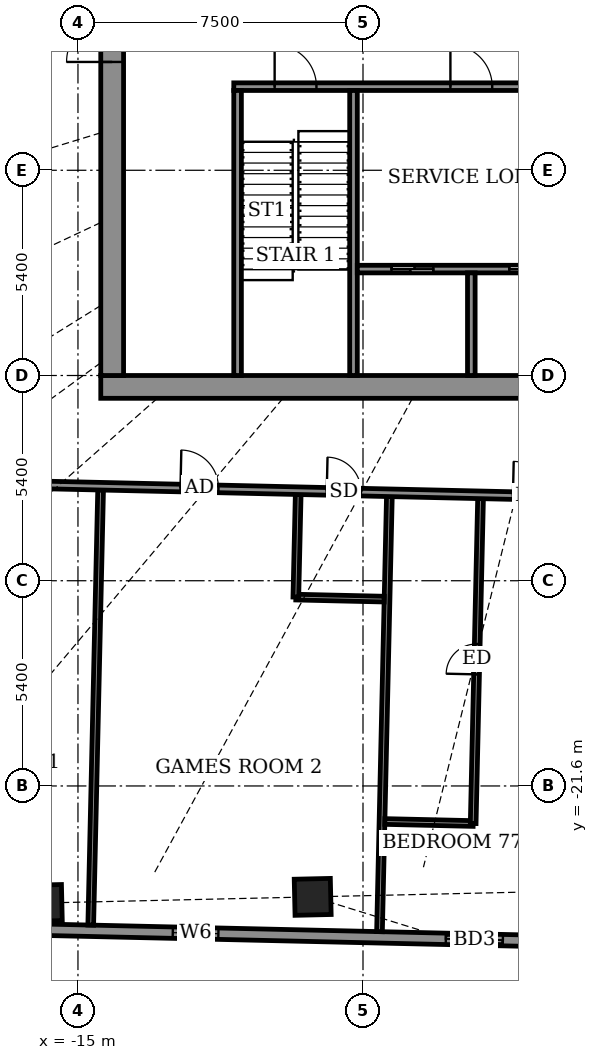
"""IFC4 building model, lengths in metres.
Left out: names, types, materials, properties, quantities, classifications, styles, units other than length and angle.
Written with IfcOpenShell. Run it as: python <this file> out.ifc"""

import sys

from ifc_helpers import new_model, si_unit, direction, frame, frame_2d, origin, origin_2d, place, context, subcontext, project, spatial, rectangle, extrude, element, fill, save


model = new_model("IFC4")
c1 = context("Model", 3, precision=1e-05, world=origin(), true_north=direction((0.0, 1.0)))
c2 = subcontext(c1, "Body", "Model", "MODEL_VIEW")
j1 = project(units=[si_unit("LENGTHUNIT", "METRE"), si_unit("PLANEANGLEUNIT", "RADIAN")], contexts=[c1])
p1 = place(None, origin())
s1 = spatial("IfcSite", under=j1, at=p1, CompositionType="ELEMENT")
p2 = place(p1, origin())
s2 = spatial("IfcBuilding", under=s1, at=p2, CompositionType="ELEMENT")
p3 = place(p2, frame((0.0, 0.0, 301.5)))
s3 = spatial("IfcBuildingStorey", under=s2, at=p3, CompositionType="ELEMENT", Elevation=301.5)
for number, where, z_axis, x_axis in (
    (1, (-15.899, -24.679, -0.55), (0.0, 0.0, 1.0), (1.0, 0.023, 0.0)),
    (2, (-8.824, -24.518, -0.55), (0.0, 0.0, 1.0), (1.0, 0.023, 0.0)),
):
    element("IfcColumn", number, at=place(p3, frame(where, z_axis=z_axis, x_axis=x_axis)), inside=s3, PredefinedType="COLUMN", context=c2, shape_type="SweptSolid", body=[
        extrude(rectangle(XDim=0.95, YDim=0.95, at=origin_2d()), origin(), (0.0, 0.0, 1.0), 4.6),
    ])
p4 = place(p3, frame((-28.264, -25.102, 0.0), z_axis=(0.0, 0.0, 1.0), x_axis=(0.999742520573, -0.022691244094, 0.0)))
e3 = element("IfcWall", 3, at=p4, inside=s3, PredefinedType="SOLIDWALL", context=c2, shape_type="SweptSolid", body=[
    extrude(rectangle(XDim=51.3, YDim=0.3, at=frame_2d((25.65, 0.0))), origin(), (0.0, 0.0, 1.0), 2.25),
])
p5 = place(p4, frame((1.745, 0.0, 0.0)))
e4 = element("IfcOpeningElement", 4, at=p5, cuts=e3, PredefinedType="OPENING", context=c2, shape_type="SweptSolid", body=[
    extrude(rectangle(XDim=1.5, YDim=2.0, at=frame_2d((0.75, 1.0))), frame((0.0, 0.16, 0.0), z_axis=(0.0, -1.0, 0.0), x_axis=(1.0, 0.0, 0.0)), (0.0, 0.0, 1.0), 0.32),
])
p6 = place(p4, frame((9.178, 0.0, 0.5)))
e5 = element("IfcOpeningElement", 5, at=p6, cuts=e3, PredefinedType="OPENING", context=c2, shape_type="SweptSolid", body=[
    extrude(rectangle(XDim=1.2, YDim=1.1, at=frame_2d((0.6, 0.55))), frame((0.0, 0.16, 0.0), z_axis=(0.0, -1.0, 0.0), x_axis=(1.0, 0.0, 0.0)), (0.0, 0.0, 1.0), 0.32),
])
p7 = place(p4, frame((15.763, 0.0, 0.5)))
e6 = element("IfcOpeningElement", 6, at=p7, cuts=e3, PredefinedType="OPENING", context=c2, shape_type="SweptSolid", body=[
    extrude(rectangle(XDim=1.2, YDim=1.1, at=frame_2d((0.6, 0.55))), frame((0.0, 0.16, 0.0), z_axis=(0.0, -1.0, 0.0), x_axis=(1.0, 0.0, 0.0)), (0.0, 0.0, 1.0), 0.32),
])
p8 = place(p4, frame((22.95, 0.0, 0.0)))
e7 = element("IfcOpeningElement", 7, at=p8, cuts=e3, PredefinedType="OPENING", context=c2, shape_type="SweptSolid", body=[
    extrude(rectangle(XDim=1.5, YDim=2.0, at=frame_2d((0.75, 1.0))), frame((0.0, 0.16, 0.0), z_axis=(0.0, -1.0, 0.0), x_axis=(1.0, 0.0, 0.0)), (0.0, 0.0, 1.0), 0.32),
])
p9 = place(p4, frame((28.219, 0.0, 0.0)))
e8 = element("IfcOpeningElement", 8, at=p9, cuts=e3, PredefinedType="OPENING", context=c2, shape_type="SweptSolid", body=[
    extrude(rectangle(XDim=1.5, YDim=2.0, at=frame_2d((0.75, 1.0))), frame((0.0, 0.16, 0.0), z_axis=(0.0, -1.0, 0.0), x_axis=(1.0, 0.0, 0.0)), (0.0, 0.0, 1.0), 0.32),
])
p10 = place(p4, frame((34.85, 0.0, 0.5)))
e9 = element("IfcOpeningElement", 9, at=p10, cuts=e3, PredefinedType="OPENING", context=c2, shape_type="SweptSolid", body=[
    extrude(rectangle(XDim=1.2, YDim=1.1, at=frame_2d((0.6, 0.55))), frame((0.0, 0.16, 0.0), z_axis=(0.0, -1.0, 0.0), x_axis=(1.0, 0.0, 0.0)), (0.0, 0.0, 1.0), 0.32),
])
p11 = place(p4, frame((43.375, 0.0, 0.5)))
e10 = element("IfcOpeningElement", 10, at=p11, cuts=e3, PredefinedType="OPENING", context=c2, shape_type="SweptSolid", body=[
    extrude(rectangle(XDim=1.2, YDim=1.1, at=frame_2d((0.6, 0.55))), frame((0.0, 0.16, 0.0), z_axis=(0.0, -1.0, 0.0), x_axis=(1.0, 0.0, 0.0)), (0.0, 0.0, 1.0), 0.32),
])
p12 = place(p4, frame((49.25, 0.0, 0.5)))
e11 = element("IfcOpeningElement", 11, at=p12, cuts=e3, PredefinedType="OPENING", context=c2, shape_type="SweptSolid", body=[
    extrude(rectangle(XDim=1.2, YDim=1.1, at=frame_2d((0.6, 0.55))), frame((0.0, 0.16, 0.0), z_axis=(0.0, -1.0, 0.0), x_axis=(1.0, 0.0, 0.0)), (0.0, 0.0, 1.0), 0.32),
])
p13 = place(p3, frame((-14.664, -25.261, 0.0), z_axis=(0.0, 0.0, 1.0), x_axis=(0.022706391805, 0.999742176649, 0.0)))
e12 = element("IfcWall", 12, at=p13, inside=s3, PredefinedType="PARTITIONING", context=c2, shape_type="SweptSolid", body=[
    extrude(rectangle(XDim=11.451, YDim=0.15, at=frame_2d((5.726, 0.0))), origin(), (0.0, 0.0, 1.0), 2.25),
])
p14 = place(p3, frame((-7.066, -25.433, 0.0), z_axis=(0.0, 0.0, 1.0), x_axis=(0.022708327922, 0.999742132674, 0.0)))
e13 = element("IfcWall", 13, at=p14, inside=s3, PredefinedType="PARTITIONING", context=c2, shape_type="SweptSolid", body=[
    extrude(rectangle(XDim=11.45, YDim=0.15, at=frame_2d((5.725, 0.0))), origin(), (0.0, 0.0, 1.0), 2.25),
])
p15 = place(p3, frame((-6.925, -22.535, 0.0), z_axis=(0.0, 0.0, 1.0), x_axis=(0.999740260747, -0.02279059109, 0.0)))
e14 = element("IfcWall", 14, at=p15, inside=s3, PredefinedType="PARTITIONING", context=c2, shape_type="SweptSolid", body=[
    extrude(rectangle(XDim=2.324, YDim=0.15, at=frame_2d((1.162, 0.0))), origin(), (0.0, 0.0, 1.0), 2.75),
])
p16 = place(p3, frame((-4.601, -22.588, 0.0), z_axis=(0.0, 0.0, 1.0), x_axis=(0.022700649323, 0.999742307057, 0.0)))
e15 = element("IfcWall", 15, at=p16, inside=s3, PredefinedType="PARTITIONING", context=c2, shape_type="SweptSolid", body=[
    extrude(rectangle(XDim=8.55, YDim=0.15, at=frame_2d((4.275, 0.0))), origin(), (0.0, 0.0, 1.0), 2.75),
])
p17 = place(p16, frame((3.925, 0.0, 0.0)))
e16 = element("IfcOpeningElement", 16, at=p17, cuts=e15, PredefinedType="OPENING", context=c2, shape_type="SweptSolid", body=[
    extrude(rectangle(XDim=0.8, YDim=2.1, at=frame_2d((0.4, 1.05))), frame((0.0, 0.085, 0.0), z_axis=(0.0, -1.0, 0.0), x_axis=(1.0, 0.0, 0.0)), (0.0, 0.0, 1.0), 0.17),
])
p18 = place(p3, frame((-9.267, -16.631, 0.0), z_axis=(0.0, 0.0, 1.0), x_axis=(0.99974053329, -0.022778632478, 0.0)))
e17 = element("IfcWall", 17, at=p18, inside=s3, PredefinedType="PARTITIONING", context=c2, shape_type="SweptSolid", body=[
    extrude(rectangle(XDim=2.326, YDim=0.15, at=frame_2d((1.163, 0.0))), origin(), (0.0, 0.0, 1.0), 2.55),
])
p19 = place(p3, frame((-9.267, -16.631, 0.0), z_axis=(0.0, 0.0, 1.0), x_axis=(0.02295958807, 0.999736393914, 0.0)))
e18 = element("IfcWall", 18, at=p19, inside=s3, PredefinedType="PARTITIONING", context=c2, shape_type="SweptSolid", body=[
    extrude(rectangle(XDim=2.701, YDim=0.15, at=frame_2d((1.351, 0.0))), origin(), (0.0, 0.0, 1.0), 2.55),
])
p20 = place(p3, frame((-27.058, -13.426, 0.0), z_axis=(0.0, 0.0, 1.0), x_axis=(0.999742445627, -0.022694545867, 0.0)))
e19 = element("IfcWall", 19, at=p20, inside=s3, PredefinedType="PARTITIONING", context=c2, shape_type="SweptSolid", body=[
    extrude(rectangle(XDim=54.509, YDim=0.2, at=frame_2d((27.255, 0.0))), origin(), (0.0, 0.0, 1.0), 2.15),
])
p21 = place(p20, frame((0.2, 0.0, 0.0)))
e20 = element("IfcOpeningElement", 20, at=p21, cuts=e19, PredefinedType="OPENING", context=c2, shape_type="SweptSolid", body=[
    extrude(rectangle(XDim=1.0, YDim=2.1, at=frame_2d((0.5, 1.05))), frame((0.0, 0.11, 0.0), z_axis=(0.0, -1.0, 0.0), x_axis=(1.0, 0.0, 0.0)), (0.0, 0.0, 1.0), 0.22),
])
p22 = place(p20, frame((4.809, 0.0, 0.0)))
e21 = element("IfcOpeningElement", 21, at=p22, cuts=e19, PredefinedType="OPENING", context=c2, shape_type="SweptSolid", body=[
    extrude(rectangle(XDim=0.9, YDim=2.1, at=frame_2d((0.45, 1.05))), frame((0.0, 0.11, 0.0), z_axis=(0.0, -1.0, 0.0), x_axis=(1.0, 0.0, 0.0)), (0.0, 0.0, 1.0), 0.22),
])
p23 = place(p20, frame((10.309, 0.0, 0.0)))
e22 = element("IfcOpeningElement", 22, at=p23, cuts=e19, PredefinedType="OPENING", context=c2, shape_type="SweptSolid", body=[
    extrude(rectangle(XDim=1.0, YDim=2.1, at=frame_2d((0.5, 1.05))), frame((0.0, 0.11, 0.0), z_axis=(0.0, -1.0, 0.0), x_axis=(1.0, 0.0, 0.0)), (0.0, 0.0, 1.0), 0.22),
])
p24 = place(p20, frame((7.309, 0.0, 0.0)))
e23 = element("IfcOpeningElement", 23, at=p24, cuts=e19, PredefinedType="OPENING", context=c2, shape_type="SweptSolid", body=[
    extrude(rectangle(XDim=0.9, YDim=2.1, at=frame_2d((0.45, 1.05))), frame((0.0, 0.11, 0.0), z_axis=(0.0, -1.0, 0.0), x_axis=(1.0, 0.0, 0.0)), (0.0, 0.0, 1.0), 0.22),
])
p25 = place(p20, frame((14.759, 0.0, 0.0)))
e24 = element("IfcOpeningElement", 24, at=p25, cuts=e19, PredefinedType="OPENING", context=c2, shape_type="SweptSolid", body=[
    extrude(rectangle(XDim=1.0, YDim=2.1, at=frame_2d((0.5, 1.05))), frame((0.0, 0.11, 0.0), z_axis=(0.0, -1.0, 0.0), x_axis=(1.0, 0.0, 0.0)), (0.0, 0.0, 1.0), 0.22),
])
p26 = place(p20, frame((18.609, 0.0, 0.0)))
e25 = element("IfcOpeningElement", 25, at=p26, cuts=e19, PredefinedType="OPENING", context=c2, shape_type="SweptSolid", body=[
    extrude(rectangle(XDim=0.9, YDim=2.1, at=frame_2d((0.45, 1.05))), frame((0.0, 0.11, 0.0), z_axis=(0.0, -1.0, 0.0), x_axis=(1.0, 0.0, 0.0)), (0.0, 0.0, 1.0), 0.22),
])
p27 = place(p20, frame((23.509, 0.0, 0.0)))
e26 = element("IfcOpeningElement", 26, at=p27, cuts=e19, PredefinedType="OPENING", context=c2, shape_type="SweptSolid", body=[
    extrude(rectangle(XDim=0.9, YDim=2.1, at=frame_2d((0.45, 1.05))), frame((0.0, 0.11, 0.0), z_axis=(0.0, -1.0, 0.0), x_axis=(1.0, 0.0, 0.0)), (0.0, 0.0, 1.0), 0.22),
])
p28 = place(p20, frame((26.109, 0.0, 0.0)))
e27 = element("IfcOpeningElement", 27, at=p28, cuts=e19, PredefinedType="OPENING", context=c2, shape_type="SweptSolid", body=[
    extrude(rectangle(XDim=0.9, YDim=2.1, at=frame_2d((0.45, 1.05))), frame((0.0, 0.11, 0.0), z_axis=(0.0, -1.0, 0.0), x_axis=(1.0, 0.0, 0.0)), (0.0, 0.0, 1.0), 0.22),
])
p29 = place(p20, frame((34.009, 0.0, 0.0)))
e28 = element("IfcOpeningElement", 28, at=p29, cuts=e19, PredefinedType="OPENING", context=c2, shape_type="SweptSolid", body=[
    extrude(rectangle(XDim=1.0, YDim=2.1, at=frame_2d((0.5, 1.05))), frame((0.0, 0.11, 0.0), z_axis=(0.0, -1.0, 0.0), x_axis=(1.0, 0.0, 0.0)), (0.0, 0.0, 1.0), 0.22),
])
p30 = place(p20, frame((41.234, 0.0, 0.0)))
e29 = element("IfcOpeningElement", 29, at=p30, cuts=e19, PredefinedType="OPENING", context=c2, shape_type="SweptSolid", body=[
    extrude(rectangle(XDim=1.0, YDim=2.1, at=frame_2d((0.5, 1.05))), frame((0.0, 0.11, 0.0), z_axis=(0.0, -1.0, 0.0), x_axis=(1.0, 0.0, 0.0)), (0.0, 0.0, 1.0), 0.22),
])
p31 = place(p20, frame((45.559, 0.0, 0.0)))
e30 = element("IfcOpeningElement", 30, at=p31, cuts=e19, PredefinedType="OPENING", context=c2, shape_type="SweptSolid", body=[
    extrude(rectangle(XDim=0.9, YDim=2.1, at=frame_2d((0.45, 1.05))), frame((0.0, 0.11, 0.0), z_axis=(0.0, -1.0, 0.0), x_axis=(1.0, 0.0, 0.0)), (0.0, 0.0, 1.0), 0.22),
])
p32 = place(p20, frame((50.587, 0.0, 0.0)))
e31 = element("IfcOpeningElement", 31, at=p32, cuts=e19, PredefinedType="OPENING", context=c2, shape_type="SweptSolid", body=[
    extrude(rectangle(XDim=1.0, YDim=2.1, at=frame_2d((0.5, 1.05))), frame((0.0, 0.11, 0.0), z_axis=(0.0, -1.0, 0.0), x_axis=(1.0, 0.0, 0.0)), (0.0, 0.0, 1.0), 0.22),
])
p33 = place(p3, frame((-14.4, -11.1, 0.0), z_axis=(0.0, 0.0, 1.0), x_axis=(1.0, 0.0, 0.0)))
e32 = element("IfcWall", 32, at=p33, inside=s3, PredefinedType="SHEAR", context=c2, shape_type="SweptSolid", body=[
    extrude(rectangle(XDim=28.8, YDim=0.6, at=frame_2d((14.4, 0.0))), origin(), (0.0, 0.0, 1.0), 4.6),
])
p34 = place(p3, frame((-14.1, -10.8, 0.0), z_axis=(0.0, 0.0, 1.0), x_axis=(0.0, 1.0, 0.0)))
e33 = element("IfcWall", 33, at=p34, inside=s3, PredefinedType="SHEAR", context=c2, shape_type="SweptSolid", body=[
    extrude(rectangle(XDim=21.6, YDim=0.6, at=frame_2d((10.8, 0.0))), origin(), (0.0, 0.0, 1.0), 4.6),
])
p35 = place(p34, frame((8.25, 0.0, 0.0)))
e34 = element("IfcOpeningElement", 34, at=p35, cuts=e33, PredefinedType="OPENING", context=c2, shape_type="SweptSolid", body=[
    extrude(rectangle(XDim=1.2, YDim=2.1, at=frame_2d((0.6, 1.05))), frame((0.0, 0.31, 0.0), z_axis=(0.0, -1.0, 0.0), x_axis=(1.0, 0.0, 0.0)), (0.0, 0.0, 1.0), 0.62),
])
p36 = place(p34, frame((15.25, 0.0, 0.0)))
e35 = element("IfcOpeningElement", 35, at=p36, cuts=e33, PredefinedType="OPENING", context=c2, shape_type="SweptSolid", body=[
    extrude(rectangle(XDim=1.2, YDim=2.1, at=frame_2d((0.6, 1.05))), frame((0.0, 0.31, 0.0), z_axis=(0.0, -1.0, 0.0), x_axis=(1.0, 0.0, 0.0)), (0.0, 0.0, 1.0), 0.62),
])
p37 = place(p3, frame((-10.9, -3.2, 0.0), z_axis=(0.0, 0.0, 1.0), x_axis=(1.0, 0.0, 0.0)))
e36 = element("IfcWall", 36, at=p37, inside=s3, PredefinedType="SHEAR", context=c2, shape_type="SweptSolid", body=[
    extrude(rectangle(XDim=21.8, YDim=0.2, at=frame_2d((10.9, 0.0))), origin(), (0.0, 0.0, 1.0), 4.05),
])
p38 = place(p37, frame((1.075, 0.0, 0.0)))
e37 = element("IfcOpeningElement", 37, at=p38, cuts=e36, PredefinedType="OPENING", context=c2, shape_type="SweptSolid", body=[
    extrude(rectangle(XDim=1.1, YDim=2.1, at=frame_2d((0.55, 1.05))), frame((0.0, 0.11, 0.0), z_axis=(0.0, -1.0, 0.0), x_axis=(1.0, 0.0, 0.0)), (0.0, 0.0, 1.0), 0.22),
])
p39 = place(p37, frame((10.325, 0.0, 0.0)))
e38 = element("IfcOpeningElement", 38, at=p39, cuts=e36, PredefinedType="OPENING", context=c2, shape_type="SweptSolid", body=[
    extrude(rectangle(XDim=1.1, YDim=2.1, at=frame_2d((0.55, 1.05))), frame((0.0, 0.11, 0.0), z_axis=(0.0, -1.0, 0.0), x_axis=(1.0, 0.0, 0.0)), (0.0, 0.0, 1.0), 0.22),
])
p40 = place(p37, frame((19.625, 0.0, 0.0)))
e39 = element("IfcOpeningElement", 39, at=p40, cuts=e36, PredefinedType="OPENING", context=c2, shape_type="SweptSolid", body=[
    extrude(rectangle(XDim=1.1, YDim=2.1, at=frame_2d((0.55, 1.05))), frame((0.0, 0.11, 0.0), z_axis=(0.0, -1.0, 0.0), x_axis=(1.0, 0.0, 0.0)), (0.0, 0.0, 1.0), 0.22),
])
p41 = place(p37, frame((5.7, 0.0, 0.0)))
e40 = element("IfcOpeningElement", 40, at=p41, cuts=e36, PredefinedType="OPENING", context=c2, shape_type="SweptSolid", body=[
    extrude(rectangle(XDim=1.1, YDim=2.1, at=frame_2d((0.55, 1.05))), frame((0.0, 0.11, 0.0), z_axis=(0.0, -1.0, 0.0), x_axis=(1.0, 0.0, 0.0)), (0.0, 0.0, 1.0), 0.22),
])
p42 = place(p37, frame((14.975, 0.0, 0.0)))
e41 = element("IfcOpeningElement", 41, at=p42, cuts=e36, PredefinedType="OPENING", context=c2, shape_type="SweptSolid", body=[
    extrude(rectangle(XDim=1.1, YDim=2.1, at=frame_2d((0.55, 1.05))), frame((0.0, 0.11, 0.0), z_axis=(0.0, -1.0, 0.0), x_axis=(1.0, 0.0, 0.0)), (0.0, 0.0, 1.0), 0.22),
])
for number, where, z_axis, x_axis in (
    (42, (-10.8, -10.8, 0.0), (0.0, 0.0, 1.0), (0.0, 1.0, 0.0)),
    (43, (-7.75, -10.8, 0.0), (0.0, 0.0, 1.0), (0.0, 1.0, 0.0)),
):
    element("IfcWall", number, at=place(p3, frame(where, z_axis=z_axis, x_axis=x_axis)), inside=s3, PredefinedType="SHEAR", context=c2, shape_type="SweptSolid", body=[
        extrude(rectangle(XDim=7.5, YDim=0.2, at=frame_2d((3.75, 0.0))), origin(), (0.0, 0.0, 1.0), 4.05),
    ])
p43 = place(p3, frame((-7.65, -8.0, 0.0), z_axis=(0.0, 0.0, 1.0), x_axis=(1.0, 0.0, 0.0)))
e44 = element("IfcWall", 44, at=p43, inside=s3, PredefinedType="SHEAR", context=c2, shape_type="SweptSolid", body=[
    extrude(rectangle(XDim=6.0, YDim=0.2, at=frame_2d((3.0, 0.0))), origin(), (0.0, 0.0, 1.0), 4.05),
])
p44 = place(p43, frame((0.9, 0.0, 0.0)))
e45 = element("IfcOpeningElement", 45, at=p44, cuts=e44, PredefinedType="OPENING", context=c2, shape_type="SweptSolid", body=[
    extrude(rectangle(XDim=1.1, YDim=2.1, at=frame_2d((0.55, 1.05))), frame((0.0, 0.11, 0.0), z_axis=(0.0, -1.0, 0.0), x_axis=(1.0, 0.0, 0.0)), (0.0, 0.0, 1.0), 0.22),
])
p45 = place(p43, frame((4.0, 0.0, 0.0)))
e46 = element("IfcOpeningElement", 46, at=p45, cuts=e44, PredefinedType="OPENING", context=c2, shape_type="SweptSolid", body=[
    extrude(rectangle(XDim=1.1, YDim=2.1, at=frame_2d((0.55, 1.05))), frame((0.0, 0.11, 0.0), z_axis=(0.0, -1.0, 0.0), x_axis=(1.0, 0.0, 0.0)), (0.0, 0.0, 1.0), 0.22),
])
p46 = place(p3, frame((-4.65, -10.8, 0.0), z_axis=(0.0, 0.0, 1.0), x_axis=(0.0, 1.0, 0.0)))
e47 = element("IfcWall", 47, at=p46, inside=s3, PredefinedType="SHEAR", context=c2, shape_type="SweptSolid", body=[
    extrude(rectangle(XDim=2.7, YDim=0.2, at=frame_2d((1.35, 0.0))), origin(), (0.0, 0.0, 1.0), 4.05),
])
p47 = place(p7, origin())
e48 = element("IfcWindow", 48, at=p47, inside=s3, PartitioningType="SINGLE_PANEL", PredefinedType="WINDOW", context=c2, shape_type="SweptSolid", body=[
    extrude(rectangle(XDim=1.2, YDim=1.1, at=frame_2d((0.6, 0.55))), frame((0.0, 0.03, 0.0), z_axis=(0.0, -1.0, 0.0), x_axis=(1.0, 0.0, 0.0)), (0.0, 0.0, 1.0), 0.06),
])
fill(e6, e48)
p48 = place(p8, origin())
e49 = element("IfcDoor", 49, at=p48, inside=s3, OperationType="SLIDING_TO_LEFT", PredefinedType="DOOR", context=c2, shape_type="SweptSolid", body=[
    extrude(rectangle(XDim=1.5, YDim=2.0, at=frame_2d((0.75, 1.0))), frame((0.0, 0.025, 0.0), z_axis=(0.0, -1.0, 0.0), x_axis=(1.0, 0.0, 0.0)), (0.0, 0.0, 1.0), 0.05),
])
fill(e7, e49)
p49 = place(p25, origin())
e50 = element("IfcDoor", 50, at=p49, inside=s3, OperationType="SINGLE_SWING_LEFT", PredefinedType="DOOR", context=c2, shape_type="SweptSolid", body=[
    extrude(rectangle(XDim=1.0, YDim=2.1, at=frame_2d((0.5, 1.05))), frame((0.0, 0.025, 0.0), z_axis=(0.0, -1.0, 0.0), x_axis=(1.0, 0.0, 0.0)), (0.0, 0.0, 1.0), 0.05),
])
fill(e24, e50)
p50 = place(p26, origin())
e51 = element("IfcDoor", 51, at=p50, inside=s3, OperationType="SINGLE_SWING_LEFT", PredefinedType="DOOR", context=c2, shape_type="SweptSolid", body=[
    extrude(rectangle(XDim=0.9, YDim=2.1, at=frame_2d((0.45, 1.05))), frame((0.0, 0.025, 0.0), z_axis=(0.0, -1.0, 0.0), x_axis=(1.0, 0.0, 0.0)), (0.0, 0.0, 1.0), 0.05),
])
fill(e25, e51)
p51 = place(p27, origin())
e52 = element("IfcDoor", 52, at=p51, inside=s3, OperationType="SINGLE_SWING_LEFT", PredefinedType="DOOR", context=c2, shape_type="SweptSolid", body=[
    extrude(rectangle(XDim=0.9, YDim=2.1, at=frame_2d((0.45, 1.05))), frame((0.0, 0.025, 0.0), z_axis=(0.0, -1.0, 0.0), x_axis=(1.0, 0.0, 0.0)), (0.0, 0.0, 1.0), 0.05),
])
fill(e26, e52)
p52 = place(p17, origin())
e53 = element("IfcDoor", 53, at=p52, inside=s3, OperationType="SINGLE_SWING_LEFT", PredefinedType="DOOR", context=c2, shape_type="SweptSolid", body=[
    extrude(rectangle(XDim=0.8, YDim=2.1, at=frame_2d((0.4, 1.05))), frame((0.0, 0.025, 0.0), z_axis=(0.0, -1.0, 0.0), x_axis=(1.0, 0.0, 0.0)), (0.0, 0.0, 1.0), 0.05),
])
fill(e16, e53)
p53 = place(p35, origin())
e54 = element("IfcDoor", 54, at=p53, inside=s3, OperationType="DOUBLE_DOOR_SINGLE_SWING", PredefinedType="DOOR", context=c2, shape_type="SweptSolid", body=[
    extrude(rectangle(XDim=1.2, YDim=2.1, at=frame_2d((0.6, 1.05))), frame((0.0, 0.025, 0.0), z_axis=(0.0, -1.0, 0.0), x_axis=(1.0, 0.0, 0.0)), (0.0, 0.0, 1.0), 0.05),
])
fill(e34, e54)
p54 = place(p44, origin())
e55 = element("IfcDoor", 55, at=p54, inside=s3, OperationType="SLIDING_TO_LEFT", PredefinedType="DOOR", context=c2, shape_type="SweptSolid", body=[
    extrude(rectangle(XDim=1.1, YDim=2.1, at=frame_2d((0.55, 1.05))), frame((0.0, 0.025, 0.0), z_axis=(0.0, -1.0, 0.0), x_axis=(1.0, 0.0, 0.0)), (0.0, 0.0, 1.0), 0.05),
])
fill(e45, e55)
p55 = place(p45, origin())
e56 = element("IfcDoor", 56, at=p55, inside=s3, OperationType="SLIDING_TO_LEFT", PredefinedType="DOOR", context=c2, shape_type="SweptSolid", body=[
    extrude(rectangle(XDim=1.1, YDim=2.1, at=frame_2d((0.55, 1.05))), frame((0.0, 0.025, 0.0), z_axis=(0.0, -1.0, 0.0), x_axis=(1.0, 0.0, 0.0)), (0.0, 0.0, 1.0), 0.05),
])
fill(e46, e56)
p56 = place(p38, origin())
e57 = element("IfcDoor", 57, at=p56, inside=s3, OperationType="SINGLE_SWING_RIGHT", PredefinedType="DOOR", context=c2, shape_type="SweptSolid", body=[
    extrude(rectangle(XDim=1.1, YDim=2.1, at=frame_2d((0.55, 1.05))), frame((0.0, 0.025, 0.0), z_axis=(0.0, -1.0, 0.0), x_axis=(1.0, 0.0, 0.0)), (0.0, 0.0, 1.0), 0.05),
])
fill(e37, e57)
p57 = place(p41, origin())
e58 = element("IfcDoor", 58, at=p57, inside=s3, OperationType="SINGLE_SWING_LEFT", PredefinedType="DOOR", context=c2, shape_type="SweptSolid", body=[
    extrude(rectangle(XDim=1.1, YDim=2.1, at=frame_2d((0.55, 1.05))), frame((0.0, 0.025, 0.0), z_axis=(0.0, -1.0, 0.0), x_axis=(1.0, 0.0, 0.0)), (0.0, 0.0, 1.0), 0.05),
])
fill(e40, e58)
save(model, sys.argv[1])
